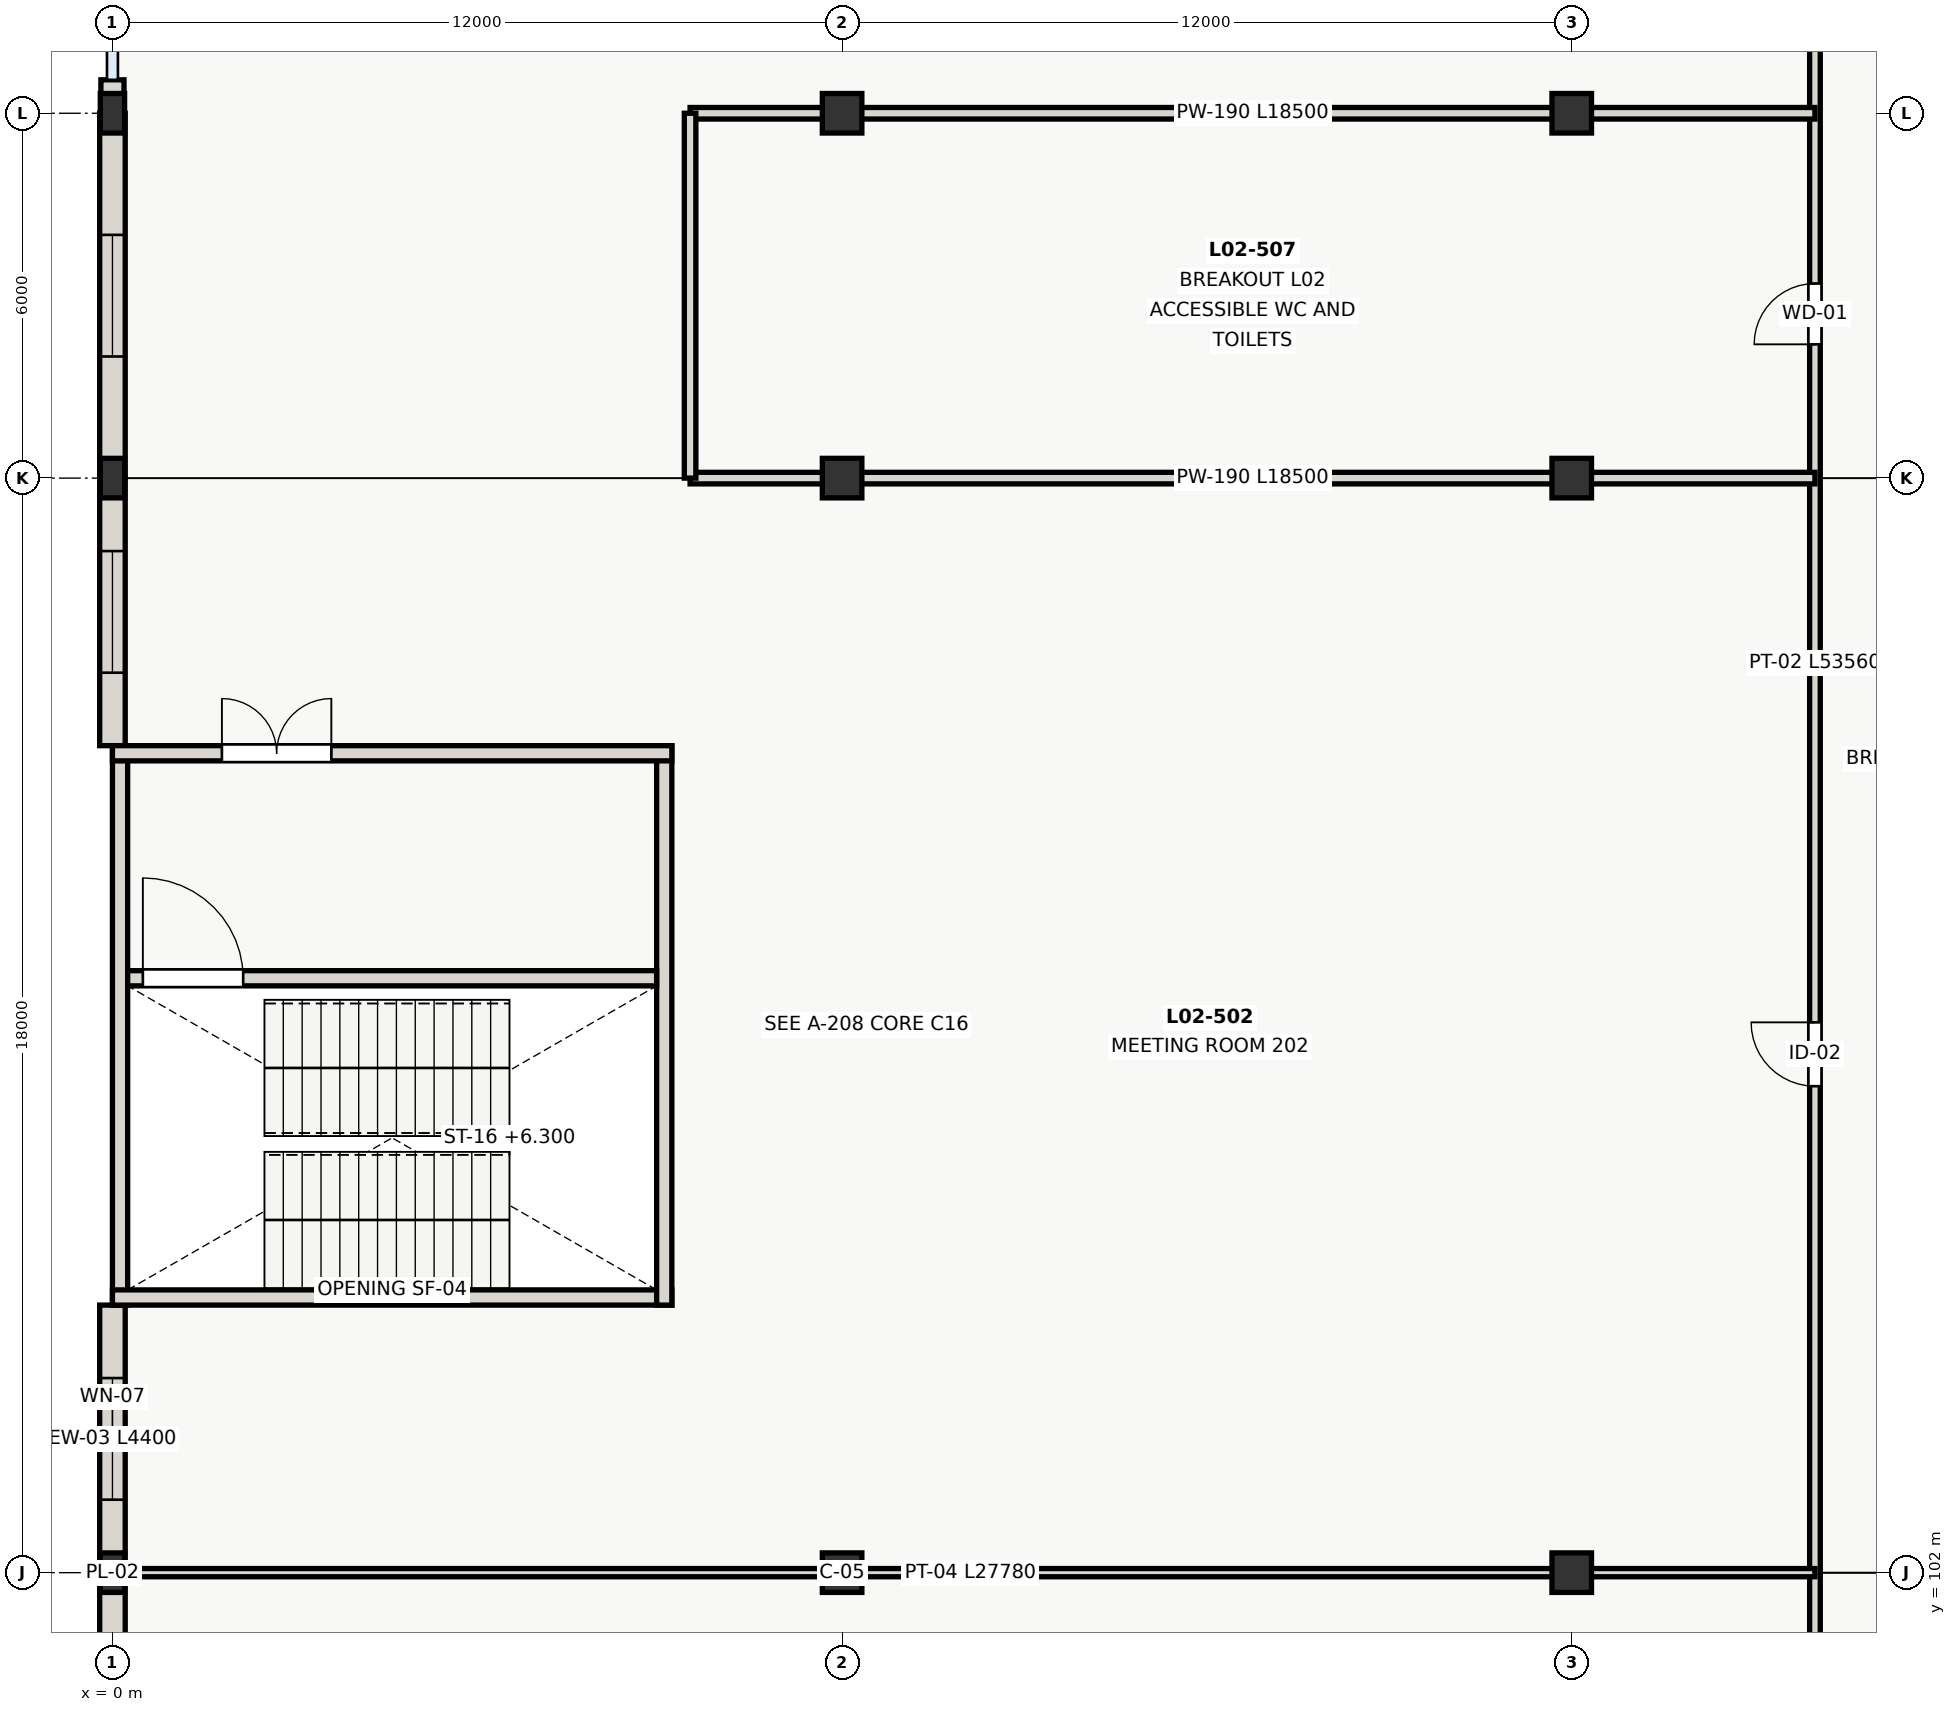
"""IFC4 building model, lengths in metres.
Left out: names, types, materials, properties, quantities, classifications, styles, units other than length and angle.
Written with IfcOpenShell. Run it as: python <this file> out.ifc"""

import sys

from ifc_helpers import new_model, si_unit, direction, frame, frame_2d, origin, origin_2d, place, context, subcontext, project, spatial, rectangle, extrude, element, fill, save


model = new_model("IFC4")
c1 = context("Model", 3, precision=1e-05, world=origin(), true_north=direction((0.0, 1.0)))
c2 = subcontext(c1, "Body", "Model", "MODEL_VIEW")
j1 = project(units=[si_unit("LENGTHUNIT", "METRE"), si_unit("PLANEANGLEUNIT", "RADIAN")], contexts=[c1])
p1 = place(None, origin())
s1 = spatial("IfcSite", under=j1, at=p1, CompositionType="ELEMENT")
p2 = place(p1, origin())
s2 = spatial("IfcBuilding", under=s1, at=p2, CompositionType="ELEMENT")
p3 = place(p2, frame((0.0, 0.0, 4.2)))
s3 = spatial("IfcBuildingStorey", under=s2, at=p3, CompositionType="ELEMENT", Elevation=4.2)
p4 = place(p3, frame((0.0, 102.0, 0.0), z_axis=(0.0, 0.0, 1.0), x_axis=(1.0, 0.0, 0.0)))
e1 = element("IfcColumn", 1, at=p4, inside=s3, PredefinedType="PILASTER", context=c2, shape_type="SweptSolid", body=[
    extrude(rectangle(XDim=0.4, YDim=0.65, at=origin_2d()), origin(), (0.0, 0.0, 1.0), 4.2),
])
for number, where, z_axis, x_axis in (
    (2, (12.0, 102.0, 0.0), (0.0, 0.0, 1.0), (1.0, 0.0, 0.0)),
    (3, (24.0, 102.0, 0.0), (0.0, 0.0, 1.0), (1.0, 0.0, 0.0)),
):
    element("IfcColumn", number, at=place(p3, frame(where, z_axis=z_axis, x_axis=x_axis)), inside=s3, PredefinedType="COLUMN", context=c2, shape_type="SweptSolid", body=[
        extrude(rectangle(XDim=0.65, YDim=0.65, at=origin_2d()), origin(), (0.0, 0.0, 1.0), 4.2),
    ])
p5 = place(p3, frame((0.0, 120.0, 0.0), z_axis=(0.0, 0.0, 1.0), x_axis=(1.0, 0.0, 0.0)))
e4 = element("IfcColumn", 4, at=p5, inside=s3, PredefinedType="PILASTER", context=c2, shape_type="SweptSolid", body=[
    extrude(rectangle(XDim=0.4, YDim=0.65, at=origin_2d()), origin(), (0.0, 0.0, 1.0), 4.2),
])
for number, where, z_axis, x_axis in (
    (5, (12.0, 120.0, 0.0), (0.0, 0.0, 1.0), (1.0, 0.0, 0.0)),
    (6, (24.0, 120.0, 0.0), (0.0, 0.0, 1.0), (1.0, 0.0, 0.0)),
):
    element("IfcColumn", number, at=place(p3, frame(where, z_axis=z_axis, x_axis=x_axis)), inside=s3, PredefinedType="COLUMN", context=c2, shape_type="SweptSolid", body=[
        extrude(rectangle(XDim=0.65, YDim=0.65, at=origin_2d()), origin(), (0.0, 0.0, 1.0), 4.2),
    ])
p6 = place(p3, frame((0.0, 126.0, 0.0), z_axis=(0.0, 0.0, 1.0), x_axis=(1.0, 0.0, 0.0)))
e7 = element("IfcColumn", 7, at=p6, inside=s3, PredefinedType="PILASTER", context=c2, shape_type="SweptSolid", body=[
    extrude(rectangle(XDim=0.4, YDim=0.65, at=origin_2d()), origin(), (0.0, 0.0, 1.0), 4.2),
])
for number, where, z_axis, x_axis in (
    (8, (12.0, 126.0, 0.0), (0.0, 0.0, 1.0), (1.0, 0.0, 0.0)),
    (9, (24.0, 126.0, 0.0), (0.0, 0.0, 1.0), (1.0, 0.0, 0.0)),
):
    element("IfcColumn", number, at=place(p3, frame(where, z_axis=z_axis, x_axis=x_axis)), inside=s3, PredefinedType="COLUMN", context=c2, shape_type="SweptSolid", body=[
        extrude(rectangle(XDim=0.65, YDim=0.65, at=origin_2d()), origin(), (0.0, 0.0, 1.0), 4.2),
    ])
p7 = place(p3, frame((0.0, 97.6, 0.0), z_axis=(0.0, 0.0, 1.0), x_axis=(0.0, 1.0, 0.0)))
e10 = element("IfcWall", 10, at=p7, inside=s3, PredefinedType="SOLIDWALL", context=c2, shape_type="SweptSolid", body=[
    extrude(rectangle(XDim=4.4, YDim=0.42, at=frame_2d((2.2, 0.0))), origin(), (0.0, 0.0, 1.0), 3.35),
])
p8 = place(p7, frame((1.2, 0.0, 0.9)))
e11 = element("IfcOpeningElement", 11, at=p8, cuts=e10, PredefinedType="OPENING", context=c2, shape_type="SweptSolid", body=[
    extrude(rectangle(XDim=2.0, YDim=2.05, at=frame_2d((1.0, 1.025))), frame((0.0, 0.22, 0.0), z_axis=(0.0, -1.0, 0.0), x_axis=(1.0, 0.0, 0.0)), (0.0, 0.0, 1.0), 0.44),
])
p9 = place(p3, frame((0.0, 102.0, 0.0), z_axis=(0.0, 0.0, 1.0), x_axis=(0.0, 1.0, 0.0)))
e12 = element("IfcWall", 12, at=p9, inside=s3, PredefinedType="SOLIDWALL", context=c2, shape_type="SweptSolid", body=[
    extrude(rectangle(XDim=4.4, YDim=0.42, at=frame_2d((2.2, 0.0))), origin(), (0.0, 0.0, 1.0), 3.35),
])
p10 = place(p9, frame((1.2, 0.0, 0.9)))
e13 = element("IfcOpeningElement", 13, at=p10, cuts=e12, PredefinedType="OPENING", context=c2, shape_type="SweptSolid", body=[
    extrude(rectangle(XDim=2.0, YDim=2.05, at=frame_2d((1.0, 1.025))), frame((0.0, 0.22, 0.0), z_axis=(0.0, -1.0, 0.0), x_axis=(1.0, 0.0, 0.0)), (0.0, 0.0, 1.0), 0.44),
])
p11 = place(p3, frame((0.0, 115.6, 0.0), z_axis=(0.0, 0.0, 1.0), x_axis=(0.0, 1.0, 0.0)))
e14 = element("IfcWall", 14, at=p11, inside=s3, PredefinedType="SOLIDWALL", context=c2, shape_type="SweptSolid", body=[
    extrude(rectangle(XDim=4.4, YDim=0.42, at=frame_2d((2.2, 0.0))), origin(), (0.0, 0.0, 1.0), 3.35),
])
p12 = place(p11, frame((1.2, 0.0, 0.9)))
e15 = element("IfcOpeningElement", 15, at=p12, cuts=e14, PredefinedType="OPENING", context=c2, shape_type="SweptSolid", body=[
    extrude(rectangle(XDim=2.0, YDim=2.05, at=frame_2d((1.0, 1.025))), frame((0.0, 0.22, 0.0), z_axis=(0.0, -1.0, 0.0), x_axis=(1.0, 0.0, 0.0)), (0.0, 0.0, 1.0), 0.44),
])
p13 = place(p3, frame((0.0, 120.0, 0.0), z_axis=(0.0, 0.0, 1.0), x_axis=(0.0, 1.0, 0.0)))
e16 = element("IfcWall", 16, at=p13, inside=s3, PredefinedType="SOLIDWALL", context=c2, shape_type="SweptSolid", body=[
    extrude(rectangle(XDim=6.0, YDim=0.42, at=frame_2d((3.0, 0.0))), origin(), (0.0, 0.0, 1.0), 3.56),
])
p14 = place(p13, frame((2.0, 0.0, 0.9)))
e17 = element("IfcOpeningElement", 17, at=p14, cuts=e16, PredefinedType="OPENING", context=c2, shape_type="SweptSolid", body=[
    extrude(rectangle(XDim=2.0, YDim=2.05, at=frame_2d((1.0, 1.025))), frame((0.0, 0.22, 0.0), z_axis=(0.0, -1.0, 0.0), x_axis=(1.0, 0.0, 0.0)), (0.0, 0.0, 1.0), 0.44),
])
p15 = place(p3, frame((0.0, 126.002, 0.0), z_axis=(0.0, 0.0, 1.0), x_axis=(0.0, 1.0, 0.0)))
e18 = element("IfcWall", 18, at=p15, inside=s3, PredefinedType="SOLIDWALL", context=c2, shape_type="SweptSolid", body=[
    extrude(rectangle(XDim=0.548, YDim=0.38, at=frame_2d((0.274, 0.0))), origin(), (0.0, 0.0, 1.0), 3.5),
])
p16 = place(p3, frame((0.125, 106.4, 0.0), z_axis=(0.0, 0.0, 1.0), x_axis=(0.0, 1.0, 0.0)))
e19 = element("IfcWall", 19, at=p16, inside=s3, PredefinedType="SHEAR", context=c2, shape_type="SweptSolid", body=[
    extrude(rectangle(XDim=9.2, YDim=0.25, at=frame_2d((4.6, 0.0))), origin(), (0.0, 0.0, 1.0), 4.2),
])
p17 = place(p3, frame((0.0, 106.525, 0.0), z_axis=(0.0, 0.0, 1.0), x_axis=(1.0, 0.0, 0.0)))
e20 = element("IfcWall", 20, at=p17, inside=s3, PredefinedType="SHEAR", context=c2, shape_type="SweptSolid", body=[
    extrude(rectangle(XDim=9.2, YDim=0.25, at=frame_2d((4.6, 0.0))), origin(), (0.0, 0.0, 1.0), 4.2),
])
p18 = place(p3, frame((9.075, 106.4, 0.0), z_axis=(0.0, 0.0, 1.0), x_axis=(0.0, 1.0, 0.0)))
e21 = element("IfcWall", 21, at=p18, inside=s3, PredefinedType="SHEAR", context=c2, shape_type="SweptSolid", body=[
    extrude(rectangle(XDim=9.2, YDim=0.25, at=frame_2d((4.6, 0.0))), origin(), (0.0, 0.0, 1.0), 4.2),
])
p19 = place(p3, frame((0.0, 115.475, 0.0), z_axis=(0.0, 0.0, 1.0), x_axis=(1.0, 0.0, 0.0)))
e22 = element("IfcWall", 22, at=p19, inside=s3, PredefinedType="SHEAR", context=c2, shape_type="SweptSolid", body=[
    extrude(rectangle(XDim=9.2, YDim=0.25, at=frame_2d((4.6, 0.0))), origin(), (0.0, 0.0, 1.0), 4.2),
])
p20 = place(p19, frame((1.8, 0.0, 0.0)))
e23 = element("IfcOpeningElement", 23, at=p20, cuts=e22, PredefinedType="OPENING", context=c2, shape_type="SweptSolid", body=[
    extrude(rectangle(XDim=1.8, YDim=2.15, at=frame_2d((0.9, 1.075))), frame((0.0, 0.135, 0.0), z_axis=(0.0, -1.0, 0.0), x_axis=(1.0, 0.0, 0.0)), (0.0, 0.0, 1.0), 0.27),
])
p21 = place(p3, frame((0.25, 111.775, 0.0), z_axis=(0.0, 0.0, 1.0), x_axis=(1.0, 0.0, 0.0)))
e24 = element("IfcWall", 24, at=p21, inside=s3, PredefinedType="SHEAR", context=c2, shape_type="SweptSolid", body=[
    extrude(rectangle(XDim=8.7, YDim=0.25, at=frame_2d((4.35, 0.0))), origin(), (0.0, 0.0, 1.0), 4.2),
])
p22 = place(p21, frame((0.25, 0.0, 0.0)))
e25 = element("IfcOpeningElement", 25, at=p22, cuts=e24, PredefinedType="OPENING", context=c2, shape_type="SweptSolid", body=[
    extrude(rectangle(XDim=1.65, YDim=2.1, at=frame_2d((0.825, 1.05))), frame((0.0, 0.135, 0.0), z_axis=(0.0, -1.0, 0.0), x_axis=(1.0, 0.0, 0.0)), (0.0, 0.0, 1.0), 0.27),
])
p23 = place(p3, frame((28.0, 84.22, 0.0), z_axis=(0.0, 0.0, 1.0), x_axis=(0.0, 1.0, 0.0)))
e26 = element("IfcWall", 26, at=p23, inside=s3, PredefinedType="PARTITIONING", context=c2, shape_type="SweptSolid", body=[
    extrude(rectangle(XDim=53.56, YDim=0.175, at=frame_2d((26.78, 0.0))), origin(), (0.0, 0.0, 1.0), 3.72),
])
p24 = place(p23, frame((1.98, 0.0, 0.0)))
e27 = element("IfcOpeningElement", 27, at=p24, cuts=e26, PredefinedType="OPENING", context=c2, shape_type="SweptSolid", body=[
    extrude(rectangle(XDim=1.05, YDim=2.1, at=frame_2d((0.525, 1.05))), frame((0.0, 0.097, 0.0), z_axis=(0.0, -1.0, 0.0), x_axis=(1.0, 0.0, 0.0)), (0.0, 0.0, 1.0), 0.195),
])
p25 = place(p23, frame((10.28, 0.0, 0.0)))
e28 = element("IfcOpeningElement", 28, at=p25, cuts=e26, PredefinedType="OPENING", context=c2, shape_type="SweptSolid", body=[
    extrude(rectangle(XDim=1.8, YDim=2.15, at=frame_2d((0.9, 1.075))), frame((0.0, 0.097, 0.0), z_axis=(0.0, -1.0, 0.0), x_axis=(1.0, 0.0, 0.0)), (0.0, 0.0, 1.0), 0.195),
])
p26 = place(p23, frame((14.58, 0.0, 0.0)))
e29 = element("IfcOpeningElement", 29, at=p26, cuts=e26, PredefinedType="OPENING", context=c2, shape_type="SweptSolid", body=[
    extrude(rectangle(XDim=1.05, YDim=2.1, at=frame_2d((0.525, 1.05))), frame((0.0, 0.097, 0.0), z_axis=(0.0, -1.0, 0.0), x_axis=(1.0, 0.0, 0.0)), (0.0, 0.0, 1.0), 0.195),
])
p27 = place(p23, frame((25.78, 0.0, 0.0)))
e30 = element("IfcOpeningElement", 30, at=p27, cuts=e26, PredefinedType="OPENING", context=c2, shape_type="SweptSolid", body=[
    extrude(rectangle(XDim=1.05, YDim=2.1, at=frame_2d((0.525, 1.05))), frame((0.0, 0.097, 0.0), z_axis=(0.0, -1.0, 0.0), x_axis=(1.0, 0.0, 0.0)), (0.0, 0.0, 1.0), 0.195),
])
p28 = place(p23, frame((37.98, 0.0, 0.0)))
e31 = element("IfcOpeningElement", 31, at=p28, cuts=e26, PredefinedType="OPENING", context=c2, shape_type="SweptSolid", body=[
    extrude(rectangle(XDim=1.0, YDim=2.1, at=frame_2d((0.5, 1.05))), frame((0.0, 0.097, 0.0), z_axis=(0.0, -1.0, 0.0), x_axis=(1.0, 0.0, 0.0)), (0.0, 0.0, 1.0), 0.195),
])
p29 = place(p23, frame((47.28, 0.0, 0.0)))
e32 = element("IfcOpeningElement", 32, at=p29, cuts=e26, PredefinedType="OPENING", context=c2, shape_type="SweptSolid", body=[
    extrude(rectangle(XDim=0.98, YDim=2.1, at=frame_2d((0.49, 1.05))), frame((0.0, 0.097, 0.0), z_axis=(0.0, -1.0, 0.0), x_axis=(1.0, 0.0, 0.0)), (0.0, 0.0, 1.0), 0.195),
])
p30 = place(p3, frame((0.22, 102.0, 0.0), z_axis=(0.0, 0.0, 1.0), x_axis=(1.0, 0.0, 0.0)))
e33 = element("IfcWall", 33, at=p30, inside=s3, PredefinedType="PARTITIONING", context=c2, shape_type="SweptSolid", body=[
    extrude(rectangle(XDim=27.78, YDim=0.135, at=frame_2d((13.89, 0.0))), origin(), (0.0, 0.0, 1.0), 3.4),
])
for number, where, z_axis, x_axis in (
    (34, (9.5, 120.0, 0.0), (0.0, 0.0, 1.0), (1.0, 0.0, 0.0)),
    (35, (9.5, 126.0, 0.0), (0.0, 0.0, 1.0), (1.0, 0.0, 0.0)),
):
    element("IfcWall", number, at=place(p3, frame(where, z_axis=z_axis, x_axis=x_axis)), inside=s3, PredefinedType="PLUMBINGWALL", context=c2, shape_type="SweptSolid", body=[
        extrude(rectangle(XDim=18.5, YDim=0.19, at=frame_2d((9.25, 0.0))), origin(), (0.0, 0.0, 1.0), 3.4),
    ])
p31 = place(p3, frame((9.5, 120.0, 0.0), z_axis=(0.0, 0.0, 1.0), x_axis=(0.0, 1.0, 0.0)))
e36 = element("IfcWall", 36, at=p31, inside=s3, PredefinedType="PLUMBINGWALL", context=c2, shape_type="SweptSolid", body=[
    extrude(rectangle(XDim=6.0, YDim=0.19, at=frame_2d((3.0, 0.0))), origin(), (0.0, 0.0, 1.0), 3.72),
])
p32 = place(p10, origin())
e37 = element("IfcWindow", 37, at=p32, inside=s3, PartitioningType="SINGLE_PANEL", PredefinedType="WINDOW", context=c2, shape_type="SweptSolid", body=[
    extrude(rectangle(XDim=2.0, YDim=2.05, at=frame_2d((1.0, 1.025))), frame((0.0, 0.03, 0.0), z_axis=(0.0, -1.0, 0.0), x_axis=(1.0, 0.0, 0.0)), (0.0, 0.0, 1.0), 0.06),
])
fill(e13, e37)
p33 = place(p12, origin())
e38 = element("IfcWindow", 38, at=p33, inside=s3, PartitioningType="SINGLE_PANEL", PredefinedType="WINDOW", context=c2, shape_type="SweptSolid", body=[
    extrude(rectangle(XDim=2.0, YDim=2.05, at=frame_2d((1.0, 1.025))), frame((0.0, 0.03, 0.0), z_axis=(0.0, -1.0, 0.0), x_axis=(1.0, 0.0, 0.0)), (0.0, 0.0, 1.0), 0.06),
])
fill(e15, e38)
p34 = place(p14, origin())
e39 = element("IfcWindow", 39, at=p34, inside=s3, PartitioningType="SINGLE_PANEL", PredefinedType="WINDOW", context=c2, shape_type="SweptSolid", body=[
    extrude(rectangle(XDim=2.0, YDim=2.05, at=frame_2d((1.0, 1.025))), frame((0.0, 0.03, 0.0), z_axis=(0.0, -1.0, 0.0), x_axis=(1.0, 0.0, 0.0)), (0.0, 0.0, 1.0), 0.06),
])
fill(e17, e39)
p35 = place(p20, origin())
e40 = element("IfcDoor", 40, at=p35, inside=s3, OperationType="DOUBLE_DOOR_SINGLE_SWING", PredefinedType="DOOR", context=c2, shape_type="SweptSolid", body=[
    extrude(rectangle(XDim=1.8, YDim=2.15, at=frame_2d((0.9, 1.075))), frame((0.0, 0.025, 0.0), z_axis=(0.0, -1.0, 0.0), x_axis=(1.0, 0.0, 0.0)), (0.0, 0.0, 1.0), 0.05),
])
fill(e23, e40)
p36 = place(p22, origin())
e41 = element("IfcDoor", 41, at=p36, inside=s3, OperationType="SINGLE_SWING_LEFT", PredefinedType="DOOR", context=c2, shape_type="SweptSolid", body=[
    extrude(rectangle(XDim=1.65, YDim=2.1, at=frame_2d((0.825, 1.05))), frame((0.0, 0.025, 0.0), z_axis=(0.0, -1.0, 0.0), x_axis=(1.0, 0.0, 0.0)), (0.0, 0.0, 1.0), 0.05),
])
fill(e25, e41)
p37 = place(p27, origin())
e42 = element("IfcDoor", 42, at=p37, inside=s3, OperationType="SINGLE_SWING_RIGHT", PredefinedType="DOOR", context=c2, shape_type="SweptSolid", body=[
    extrude(rectangle(XDim=1.05, YDim=2.1, at=frame_2d((0.525, 1.05))), frame((0.0, 0.025, 0.0), z_axis=(0.0, -1.0, 0.0), x_axis=(1.0, 0.0, 0.0)), (0.0, 0.0, 1.0), 0.05),
])
fill(e30, e42)
p38 = place(p28, origin())
e43 = element("IfcDoor", 43, at=p38, inside=s3, OperationType="SINGLE_SWING_LEFT", PredefinedType="DOOR", context=c2, shape_type="SweptSolid", body=[
    extrude(rectangle(XDim=1.0, YDim=2.1, at=frame_2d((0.5, 1.05))), frame((0.0, 0.025, 0.0), z_axis=(0.0, -1.0, 0.0), x_axis=(1.0, 0.0, 0.0)), (0.0, 0.0, 1.0), 0.05),
])
fill(e31, e43)
save(model, sys.argv[1])
